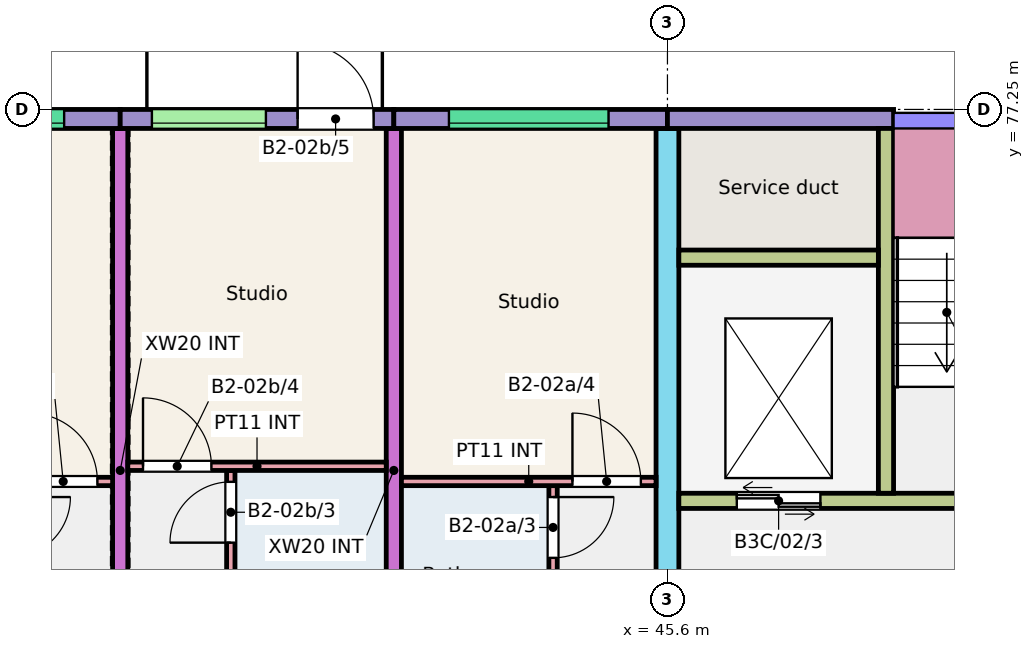
"""IFC4 building model, lengths in metres.
Left out: names, types, materials, properties, quantities, classifications, styles, units other than length and angle.
Written with IfcOpenShell. Run it as: python <this file> out.ifc"""

import sys

from ifc_helpers import new_model, si_unit, direction, frame, frame_2d, origin, place, context, subcontext, project, spatial, rectangle, extrude, element, fill, save


model = new_model("IFC4")
c1 = context("Model", 3, precision=1e-05, world=origin(), true_north=direction((0.0, 1.0)))
c2 = subcontext(c1, "Body", "Model", "MODEL_VIEW")
j1 = project(units=[si_unit("LENGTHUNIT", "METRE"), si_unit("PLANEANGLEUNIT", "RADIAN")], contexts=[c1])
p1 = place(None, origin())
s1 = spatial("IfcSite", under=j1, at=p1, CompositionType="ELEMENT")
p2 = place(p1, origin())
s2 = spatial("IfcBuilding", under=s1, at=p2, CompositionType="ELEMENT")
p3 = place(p2, frame((0.0, 0.0, 6.0)))
s3 = spatial("IfcBuildingStorey", under=s2, at=p3, CompositionType="ELEMENT", Elevation=6.0)
for number, where, z_axis, x_axis in (
    (1, (38.4, 68.0, 0.0), (0.0, 0.0, 1.0), (0.0, 1.0, 0.0)),
    (2, (42.0, 68.0, 0.0), (0.0, 0.0, 1.0), (0.0, 1.0, 0.0)),
):
    element("IfcWall", number, at=place(p3, frame(where, z_axis=z_axis, x_axis=x_axis)), inside=s3, PredefinedType="SHEAR", context=c2, shape_type="SweptSolid", body=[
        extrude(rectangle(XDim=9.0, YDim=0.2, at=frame_2d((4.5, 0.0))), origin(), (0.0, 0.0, 1.0), 3.0),
    ])
p4 = place(p3, frame((45.6, 66.0, 0.0), z_axis=(0.0, 0.0, 1.0), x_axis=(0.0, 1.0, 0.0)))
e3 = element("IfcWall", 3, at=p4, inside=s3, PredefinedType="SHEAR", context=c2, shape_type="SweptSolid", body=[
    extrude(rectangle(XDim=11.0, YDim=0.3, at=frame_2d((5.5, 0.0))), origin(), (0.0, 0.0, 1.0), 3.0),
])
p5 = place(p4, frame((0.3, 0.0, 0.0)))
e4 = element("IfcOpeningElement", 4, at=p5, cuts=e3, PredefinedType="OPENING", context=c2, shape_type="SweptSolid", body=[
    extrude(rectangle(XDim=1.2, YDim=2.1, at=frame_2d((0.6, 1.05))), frame((0.0, 0.16, 0.0), z_axis=(0.0, -1.0, 0.0), x_axis=(1.0, 0.0, 0.0)), (0.0, 0.0, 1.0), 0.32),
])
p6 = place(p3, frame((34.8, 77.125, 0.0), z_axis=(0.0, 0.0, 1.0), x_axis=(1.0, 0.0, 0.0)))
e5 = element("IfcWall", 5, at=p6, inside=s3, PredefinedType="SOLIDWALL", context=c2, shape_type="SweptSolid", body=[
    extrude(rectangle(XDim=3.6, YDim=0.25, at=frame_2d((1.8, 0.0))), origin(), (0.0, 0.0, 1.0), 3.0),
])
p7 = place(p6, frame((0.762, 0.0, 1.2)))
e6 = element("IfcOpeningElement", 6, at=p7, cuts=e5, PredefinedType="OPENING", context=c2, shape_type="SweptSolid", body=[
    extrude(rectangle(XDim=2.1, YDim=1.2, at=frame_2d((1.05, 0.6))), frame((0.0, 0.135, 0.0), z_axis=(0.0, -1.0, 0.0), x_axis=(1.0, 0.0, 0.0)), (0.0, 0.0, 1.0), 0.27),
])
p8 = place(p3, frame((38.4, 77.125, 0.0), z_axis=(0.0, 0.0, 1.0), x_axis=(1.0, 0.0, 0.0)))
e7 = element("IfcWall", 7, at=p8, inside=s3, PredefinedType="SOLIDWALL", context=c2, shape_type="SweptSolid", body=[
    extrude(rectangle(XDim=3.6, YDim=0.25, at=frame_2d((1.8, 0.0))), origin(), (0.0, 0.0, 1.0), 3.0),
])
p9 = place(p8, frame((0.417, 0.0, 1.2)))
e8 = element("IfcOpeningElement", 8, at=p9, cuts=e7, PredefinedType="OPENING", context=c2, shape_type="SweptSolid", body=[
    extrude(rectangle(XDim=1.5, YDim=1.2, at=frame_2d((0.75, 0.6))), frame((0.0, 0.135, 0.0), z_axis=(0.0, -1.0, 0.0), x_axis=(1.0, 0.0, 0.0)), (0.0, 0.0, 1.0), 0.27),
])
p10 = place(p8, frame((2.334, 0.0, 0.0)))
e9 = element("IfcOpeningElement", 9, at=p10, cuts=e7, PredefinedType="OPENING", context=c2, shape_type="SweptSolid", body=[
    extrude(rectangle(XDim=1.0, YDim=2.1, at=frame_2d((0.5, 1.05))), frame((0.0, 0.135, 0.0), z_axis=(0.0, -1.0, 0.0), x_axis=(1.0, 0.0, 0.0)), (0.0, 0.0, 1.0), 0.27),
])
p11 = place(p3, frame((42.0, 77.125, 0.0), z_axis=(0.0, 0.0, 1.0), x_axis=(1.0, 0.0, 0.0)))
e10 = element("IfcWall", 10, at=p11, inside=s3, PredefinedType="SOLIDWALL", context=c2, shape_type="SweptSolid", body=[
    extrude(rectangle(XDim=3.6, YDim=0.25, at=frame_2d((1.8, 0.0))), origin(), (0.0, 0.0, 1.0), 3.0),
])
p12 = place(p11, frame((0.725, 0.0, 1.2)))
e11 = element("IfcOpeningElement", 11, at=p12, cuts=e10, PredefinedType="OPENING", context=c2, shape_type="SweptSolid", body=[
    extrude(rectangle(XDim=2.1, YDim=1.2, at=frame_2d((1.05, 0.6))), frame((0.0, 0.135, 0.0), z_axis=(0.0, -1.0, 0.0), x_axis=(1.0, 0.0, 0.0)), (0.0, 0.0, 1.0), 0.27),
])
p13 = place(p3, frame((45.6, 77.125, 0.0), z_axis=(0.0, 0.0, 1.0), x_axis=(1.0, 0.0, 0.0)))
e12 = element("IfcWall", 12, at=p13, inside=s3, PredefinedType="SOLIDWALL", context=c2, shape_type="SweptSolid", body=[
    extrude(rectangle(XDim=2.975, YDim=0.25, at=frame_2d((1.487, 0.0))), origin(), (0.0, 0.0, 1.0), 3.0),
])
p14 = place(p3, frame((45.75, 72.1, 0.0), z_axis=(0.0, 0.0, 1.0), x_axis=(1.0, 0.0, 0.0)))
e13 = element("IfcWall", 13, at=p14, inside=s3, PredefinedType="SHEAR", context=c2, shape_type="SweptSolid", body=[
    extrude(rectangle(XDim=5.725, YDim=0.2, at=frame_2d((2.863, 0.0))), origin(), (0.0, 0.0, 1.0), 3.0),
])
p15 = place(p14, frame((3.775, 0.0, 0.0)))
e14 = element("IfcOpeningElement", 14, at=p15, cuts=e13, PredefinedType="OPENING", context=c2, shape_type="SweptSolid", body=[
    extrude(rectangle(XDim=1.0, YDim=2.1, at=frame_2d((0.5, 1.05))), frame((0.0, 0.11, 0.0), z_axis=(0.0, -1.0, 0.0), x_axis=(1.0, 0.0, 0.0)), (0.0, 0.0, 1.0), 0.22),
])
p16 = place(p14, frame((0.762, 0.0, 0.0)))
e15 = element("IfcOpeningElement", 15, at=p16, cuts=e13, PredefinedType="OPENING", context=c2, shape_type="SweptSolid", body=[
    extrude(rectangle(XDim=1.1, YDim=2.1, at=frame_2d((0.55, 1.05))), frame((0.0, 0.11, 0.0), z_axis=(0.0, -1.0, 0.0), x_axis=(1.0, 0.0, 0.0)), (0.0, 0.0, 1.0), 0.22),
])
p17 = place(p3, frame((48.475, 72.2, 0.0), z_axis=(0.0, 0.0, 1.0), x_axis=(0.0, 1.0, 0.0)))
e16 = element("IfcWall", 16, at=p17, inside=s3, PredefinedType="SHEAR", context=c2, shape_type="SweptSolid", body=[
    extrude(rectangle(XDim=4.8, YDim=0.2, at=frame_2d((2.4, 0.0))), origin(), (0.0, 0.0, 1.0), 3.0),
])
p18 = place(p3, frame((45.75, 75.3, 0.0), z_axis=(0.0, 0.0, 1.0), x_axis=(1.0, 0.0, 0.0)))
e17 = element("IfcWall", 17, at=p18, inside=s3, PredefinedType="SHEAR", context=c2, shape_type="SweptSolid", body=[
    extrude(rectangle(XDim=2.625, YDim=0.2, at=frame_2d((1.312, 0.0))), origin(), (0.0, 0.0, 1.0), 3.0),
])
p19 = place(p3, frame((44.095, 68.0, 0.0), z_axis=(0.0, 0.0, 1.0), x_axis=(0.0, 1.0, 0.0)))
e18 = element("IfcWall", 18, at=p19, inside=s3, PredefinedType="PARTITIONING", context=c2, shape_type="SweptSolid", body=[
    extrude(rectangle(XDim=4.3, YDim=0.11, at=frame_2d((2.15, 0.0))), origin(), (0.0, 0.0, 1.0), 2.8),
])
p20 = place(p19, frame((0.2, 0.0, 0.0)))
e19 = element("IfcOpeningElement", 19, at=p20, cuts=e18, PredefinedType="OPENING", context=c2, shape_type="SweptSolid", body=[
    extrude(rectangle(XDim=0.8, YDim=2.1, at=frame_2d((0.4, 1.05))), frame((0.0, 0.065, 0.0), z_axis=(0.0, -1.0, 0.0), x_axis=(1.0, 0.0, 0.0)), (0.0, 0.0, 1.0), 0.13),
])
p21 = place(p19, frame((3.35, 0.0, 0.0)))
e20 = element("IfcOpeningElement", 20, at=p21, cuts=e18, PredefinedType="OPENING", context=c2, shape_type="SweptSolid", body=[
    extrude(rectangle(XDim=0.8, YDim=2.1, at=frame_2d((0.4, 1.05))), frame((0.0, 0.065, 0.0), z_axis=(0.0, -1.0, 0.0), x_axis=(1.0, 0.0, 0.0)), (0.0, 0.0, 1.0), 0.13),
])
p22 = place(p3, frame((42.1, 72.355, 0.0), z_axis=(0.0, 0.0, 1.0), x_axis=(1.0, 0.0, 0.0)))
e21 = element("IfcWall", 21, at=p22, inside=s3, PredefinedType="PARTITIONING", context=c2, shape_type="SweptSolid", body=[
    extrude(rectangle(XDim=3.35, YDim=0.11, at=frame_2d((1.675, 0.0))), origin(), (0.0, 0.0, 1.0), 2.8),
])
p23 = place(p22, frame((2.25, 0.0, 0.0)))
e22 = element("IfcOpeningElement", 22, at=p23, cuts=e21, PredefinedType="OPENING", context=c2, shape_type="SweptSolid", body=[
    extrude(rectangle(XDim=0.9, YDim=2.1, at=frame_2d((0.45, 1.05))), frame((0.0, 0.065, 0.0), z_axis=(0.0, -1.0, 0.0), x_axis=(1.0, 0.0, 0.0)), (0.0, 0.0, 1.0), 0.13),
])
p24 = place(p3, frame((39.855, 68.0, 0.0), z_axis=(0.0, 0.0, 1.0), x_axis=(0.0, 1.0, 0.0)))
e23 = element("IfcWall", 23, at=p24, inside=s3, PredefinedType="PARTITIONING", context=c2, shape_type="SweptSolid", body=[
    extrude(rectangle(XDim=4.5, YDim=0.11, at=frame_2d((2.25, 0.0))), origin(), (0.0, 0.0, 1.0), 2.8),
])
p25 = place(p24, frame((0.2, 0.0, 0.0)))
e24 = element("IfcOpeningElement", 24, at=p25, cuts=e23, PredefinedType="OPENING", context=c2, shape_type="SweptSolid", body=[
    extrude(rectangle(XDim=0.8, YDim=2.1, at=frame_2d((0.4, 1.05))), frame((0.0, 0.065, 0.0), z_axis=(0.0, -1.0, 0.0), x_axis=(1.0, 0.0, 0.0)), (0.0, 0.0, 1.0), 0.13),
])
p26 = place(p24, frame((3.55, 0.0, 0.0)))
e25 = element("IfcOpeningElement", 25, at=p26, cuts=e23, PredefinedType="OPENING", context=c2, shape_type="SweptSolid", body=[
    extrude(rectangle(XDim=0.8, YDim=2.1, at=frame_2d((0.4, 1.05))), frame((0.0, 0.065, 0.0), z_axis=(0.0, -1.0, 0.0), x_axis=(1.0, 0.0, 0.0)), (0.0, 0.0, 1.0), 0.13),
])
p27 = place(p3, frame((38.5, 72.555, 0.0), z_axis=(0.0, 0.0, 1.0), x_axis=(1.0, 0.0, 0.0)))
e26 = element("IfcWall", 26, at=p27, inside=s3, PredefinedType="PARTITIONING", context=c2, shape_type="SweptSolid", body=[
    extrude(rectangle(XDim=3.4, YDim=0.11, at=frame_2d((1.7, 0.0))), origin(), (0.0, 0.0, 1.0), 2.8),
])
p28 = place(p27, frame((0.2, 0.0, 0.0)))
e27 = element("IfcOpeningElement", 27, at=p28, cuts=e26, PredefinedType="OPENING", context=c2, shape_type="SweptSolid", body=[
    extrude(rectangle(XDim=0.9, YDim=2.1, at=frame_2d((0.45, 1.05))), frame((0.0, 0.065, 0.0), z_axis=(0.0, -1.0, 0.0), x_axis=(1.0, 0.0, 0.0)), (0.0, 0.0, 1.0), 0.13),
])
p29 = place(p3, frame((34.925, 72.355, 0.0), z_axis=(0.0, 0.0, 1.0), x_axis=(1.0, 0.0, 0.0)))
e28 = element("IfcWall", 28, at=p29, inside=s3, PredefinedType="PARTITIONING", context=c2, shape_type="SweptSolid", body=[
    extrude(rectangle(XDim=3.375, YDim=0.11, at=frame_2d((1.688, 0.0))), origin(), (0.0, 0.0, 1.0), 2.8),
])
p30 = place(p29, frame((2.275, 0.0, 0.0)))
e29 = element("IfcOpeningElement", 29, at=p30, cuts=e28, PredefinedType="OPENING", context=c2, shape_type="SweptSolid", body=[
    extrude(rectangle(XDim=0.9, YDim=2.1, at=frame_2d((0.45, 1.05))), frame((0.0, 0.065, 0.0), z_axis=(0.0, -1.0, 0.0), x_axis=(1.0, 0.0, 0.0)), (0.0, 0.0, 1.0), 0.13),
])
p31 = place(p12, origin())
e30 = element("IfcWindow", 30, at=p31, inside=s3, PartitioningType="SINGLE_PANEL", PredefinedType="WINDOW", context=c2, shape_type="SweptSolid", body=[
    extrude(rectangle(XDim=2.1, YDim=1.2, at=frame_2d((1.05, 0.6))), frame((0.0, -0.025, 0.0), z_axis=(0.0, -1.0, 0.0), x_axis=(1.0, 0.0, 0.0)), (0.0, 0.0, 1.0), 0.06),
])
fill(e11, e30)
p32 = place(p9, origin())
e31 = element("IfcWindow", 31, at=p32, inside=s3, PartitioningType="SINGLE_PANEL", PredefinedType="WINDOW", context=c2, shape_type="SweptSolid", body=[
    extrude(rectangle(XDim=1.5, YDim=1.2, at=frame_2d((0.75, 0.6))), frame((0.0, -0.025, 0.0), z_axis=(0.0, -1.0, 0.0), x_axis=(1.0, 0.0, 0.0)), (0.0, 0.0, 1.0), 0.06),
])
fill(e8, e31)
p33 = place(p7, origin())
e32 = element("IfcWindow", 32, at=p33, inside=s3, PartitioningType="SINGLE_PANEL", PredefinedType="WINDOW", context=c2, shape_type="SweptSolid", body=[
    extrude(rectangle(XDim=2.1, YDim=1.2, at=frame_2d((1.05, 0.6))), frame((0.0, -0.025, 0.0), z_axis=(0.0, -1.0, 0.0), x_axis=(1.0, 0.0, 0.0)), (0.0, 0.0, 1.0), 0.06),
])
fill(e6, e32)
p34 = place(p21, origin())
e33 = element("IfcDoor", 33, at=p34, inside=s3, OperationType="SINGLE_SWING_RIGHT", PredefinedType="DOOR", context=c2, shape_type="SweptSolid", body=[
    extrude(rectangle(XDim=0.8, YDim=2.1, at=frame_2d((0.4, 1.05))), frame((0.0, 0.025, 0.0), z_axis=(0.0, -1.0, 0.0), x_axis=(1.0, 0.0, 0.0)), (0.0, 0.0, 1.0), 0.05),
])
fill(e20, e33)
p35 = place(p23, origin())
e34 = element("IfcDoor", 34, at=p35, inside=s3, OperationType="SINGLE_SWING_LEFT", PredefinedType="DOOR", context=c2, shape_type="SweptSolid", body=[
    extrude(rectangle(XDim=0.9, YDim=2.1, at=frame_2d((0.45, 1.05))), frame((0.0, 0.025, 0.0), z_axis=(0.0, -1.0, 0.0), x_axis=(1.0, 0.0, 0.0)), (0.0, 0.0, 1.0), 0.05),
])
fill(e22, e34)
p36 = place(p26, origin())
e35 = element("IfcDoor", 35, at=p36, inside=s3, OperationType="SINGLE_SWING_LEFT", PredefinedType="DOOR", context=c2, shape_type="SweptSolid", body=[
    extrude(rectangle(XDim=0.8, YDim=2.1, at=frame_2d((0.4, 1.05))), frame((0.0, 0.025, 0.0), z_axis=(0.0, -1.0, 0.0), x_axis=(1.0, 0.0, 0.0)), (0.0, 0.0, 1.0), 0.05),
])
fill(e25, e35)
p37 = place(p28, origin())
e36 = element("IfcDoor", 36, at=p37, inside=s3, OperationType="SINGLE_SWING_LEFT", PredefinedType="DOOR", context=c2, shape_type="SweptSolid", body=[
    extrude(rectangle(XDim=0.9, YDim=2.1, at=frame_2d((0.45, 1.05))), frame((0.0, 0.025, 0.0), z_axis=(0.0, -1.0, 0.0), x_axis=(1.0, 0.0, 0.0)), (0.0, 0.0, 1.0), 0.05),
])
fill(e27, e36)
p38 = place(p10, origin())
e37 = element("IfcDoor", 37, at=p38, inside=s3, OperationType="SINGLE_SWING_LEFT", PredefinedType="DOOR", context=c2, shape_type="SweptSolid", body=[
    extrude(rectangle(XDim=1.0, YDim=2.1, at=frame_2d((0.5, 1.05))), frame((0.0, 0.025, 0.0), z_axis=(0.0, -1.0, 0.0), x_axis=(1.0, 0.0, 0.0)), (0.0, 0.0, 1.0), 0.05),
])
fill(e9, e37)
p39 = place(p30, origin())
e38 = element("IfcDoor", 38, at=p39, inside=s3, OperationType="SINGLE_SWING_LEFT", PredefinedType="DOOR", context=c2, shape_type="SweptSolid", body=[
    extrude(rectangle(XDim=0.9, YDim=2.1, at=frame_2d((0.45, 1.05))), frame((0.0, 0.025, 0.0), z_axis=(0.0, -1.0, 0.0), x_axis=(1.0, 0.0, 0.0)), (0.0, 0.0, 1.0), 0.05),
])
fill(e29, e38)
p40 = place(p16, origin())
e39 = element("IfcDoor", 39, at=p40, inside=s3, OperationType="DOUBLE_DOOR_SLIDING", PredefinedType="DOOR", context=c2, shape_type="SweptSolid", body=[
    extrude(rectangle(XDim=1.1, YDim=2.1, at=frame_2d((0.55, 1.05))), frame((0.0, 0.025, 0.0), z_axis=(0.0, -1.0, 0.0), x_axis=(1.0, 0.0, 0.0)), (0.0, 0.0, 1.0), 0.05),
])
fill(e15, e39)
save(model, sys.argv[1])
